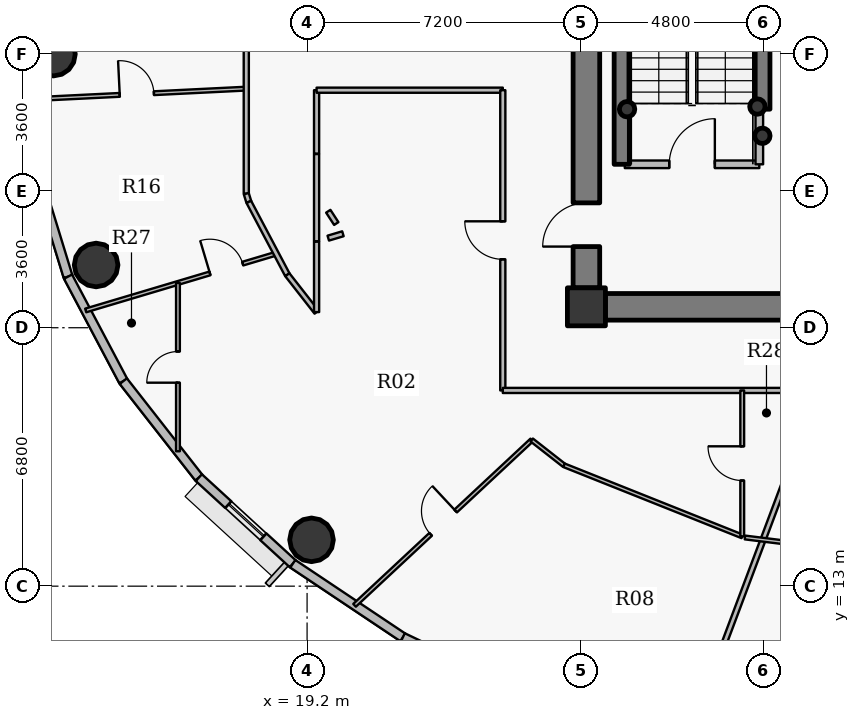
"""IFC4 building model, lengths in metres.
Left out: names, types, materials, properties, quantities, classifications, styles, units other than length and angle.
Written with IfcOpenShell. Run it as: python <this file> out.ifc"""

import sys

from ifc_helpers import new_model, si_unit, direction, frame, frame_2d, origin, origin_2d, place, context, subcontext, project, spatial, rectangle, hollow_circle, extrude, source, transform, mapped, element, fill, save


model = new_model("IFC4")
c1 = context("Model", 3, precision=1e-05, world=origin(), true_north=direction((0.0, 1.0)))
c2 = subcontext(c1, "Body", "Model", "MODEL_VIEW")
j1 = project(units=[si_unit("LENGTHUNIT", "METRE"), si_unit("PLANEANGLEUNIT", "RADIAN")], contexts=[c1])
p1 = place(None, origin())
s1 = spatial("IfcSite", under=j1, at=p1, CompositionType="ELEMENT")
p2 = place(p1, origin())
s2 = spatial("IfcBuilding", under=s1, at=p2, CompositionType="ELEMENT")
p3 = place(p2, frame((0.0, 0.0, 225.3)))
s3 = spatial("IfcBuildingStorey", under=s2, at=p3, CompositionType="ELEMENT", Elevation=225.3)
p4 = place(p3, frame((26.55, 20.35, 0.0), z_axis=(0.0, 0.0, 1.0), x_axis=(1.0, 0.0, 0.0)))
e1 = element("IfcColumn", 1, at=p4, inside=s3, PredefinedType="COLUMN", context=c2, shape_type="SweptSolid", body=[
    extrude(rectangle(XDim=1.0, YDim=1.0, at=origin_2d()), origin(), (0.0, 0.0, 1.0), 3.75),
])
p5 = place(p3, frame((27.48, 24.1, 0.0), z_axis=(0.0, 0.0, 1.0), x_axis=(0.0, 1.0, 0.0)))
e2 = element("IfcWall", 2, at=p5, inside=s3, PredefinedType="SHEAR", context=c2, shape_type="SweptSolid", body=[
    extrude(rectangle(XDim=8.6, YDim=0.4, at=frame_2d((4.3, 0.0))), origin(), (0.0, 0.0, 1.0), 3.75),
])
for number, where, z_axis, x_axis in (
    (3, (31.05, 25.62, 0.0), (0.0, 0.0, 1.0), (1.0, 0.0, 0.0)),
    (4, (31.18, 24.85, 0.0), (0.0, 0.0, 1.0), (1.0, 0.0, 0.0)),
    (5, (27.62, 25.55, 0.0), (0.0, 0.0, 1.0), (1.0, 0.0, 0.0)),
):
    element("IfcColumn", number, at=place(p3, frame(where, z_axis=z_axis, x_axis=x_axis)), inside=s3, PredefinedType="COLUMN", context=c2, shape_type="SweptSolid", body=[
        extrude(hollow_circle(Radius=0.203, WallThickness=0.016, at=origin_2d()), origin(), (0.0, 0.0, 1.0), 3.75),
    ])
p6 = place(p3, frame((44.95, 20.35, 0.0), z_axis=(0.0, 0.0, 1.0), x_axis=(-1.0, 0.0, 0.0)))
e6 = element("IfcWall", 6, at=p6, inside=s3, PredefinedType="SHEAR", context=c2, shape_type="SweptSolid", body=[
    extrude(rectangle(XDim=17.9, YDim=0.7, at=frame_2d((8.95, 0.0))), origin(), (0.0, 0.0, 1.0), 3.05),
])
p7 = place(p6, frame((9.7, 0.0, 0.0)))
e7 = element("IfcOpeningElement", 7, at=p7, cuts=e6, PredefinedType="OPENING", context=c2, shape_type="SweptSolid", body=[
    extrude(rectangle(XDim=1.15, YDim=2.15, at=origin_2d()), frame((0.575, 0.36, 1.075), z_axis=(0.0, -1.0, 0.0), x_axis=(1.0, 0.0, 0.0)), (0.0, 0.0, 1.0), 0.72),
])
p8 = place(p3, frame((26.55, 20.85, 0.0), z_axis=(0.0, 0.0, 1.0), x_axis=(0.0, 1.0, 0.0)))
e8 = element("IfcWall", 8, at=p8, inside=s3, PredefinedType="SHEAR", context=c2, shape_type="SweptSolid", body=[
    extrude(rectangle(XDim=12.3, YDim=0.7, at=frame_2d((6.15, 0.0))), origin(), (0.0, 0.0, 1.0), 3.05),
])
p9 = place(p8, frame((1.085, 0.0, 0.0)))
e9 = element("IfcOpeningElement", 9, at=p9, cuts=e8, PredefinedType="OPENING", context=c2, shape_type="SweptSolid", body=[
    extrude(rectangle(XDim=1.15, YDim=2.15, at=origin_2d()), frame((0.575, 0.36, 1.075), z_axis=(0.0, -1.0, 0.0), x_axis=(1.0, 0.0, 0.0)), (0.0, 0.0, 1.0), 0.72),
])
p10 = place(p3, frame((31.18, 25.55, 0.0), z_axis=(0.0, 0.0, 1.0), x_axis=(0.0, 1.0, 0.0)))
e10 = element("IfcWall", 10, at=p10, inside=s3, PredefinedType="SHEAR", context=c2, shape_type="SweptSolid", body=[
    extrude(rectangle(XDim=2.25, YDim=0.4, at=frame_2d((1.125, 0.0))), origin(), (0.0, 0.0, 1.0), 3.1),
])
for number, where, z_axis, x_axis in (
    (11, (12.525, 27.0, 0.0), (0.0, 0.0, 1.0), (1.0, 0.0, 0.0)),
    (12, (13.649, 21.451, 0.0), (0.0, 0.0, 1.0), (1.0, 0.0, 0.0)),
    (13, (19.317, 14.219, 0.0), (0.0, 0.0, 1.0), (1.0, 0.0, 0.0)),
):
    element("IfcColumn", number, at=place(p3, frame(where, z_axis=z_axis, x_axis=x_axis)), inside=s3, PredefinedType="COLUMN", context=c2, shape_type="SweptSolid", body=[
        extrude(hollow_circle(Radius=0.575, WallThickness=0.036, at=origin_2d()), origin(), (0.0, 0.0, 1.0), 3.75),
    ])
p11 = place(p3, frame((12.91, 21.144, 0.0), z_axis=(0.0, 0.0, 1.0), x_axis=(-0.293132907334, 0.95607170162, 0.0)))
e14 = element("IfcWall", 14, at=p11, inside=s3, PredefinedType="SOLIDWALL", context=c2, shape_type="SweptSolid", body=[
    extrude(rectangle(XDim=3.025, YDim=0.24, at=frame_2d((1.512, 0.0))), origin(), (0.0, 0.0, 1.0), 3.5),
])
p12 = place(p3, frame((14.364, 18.395, 0.0), z_axis=(0.0, 0.0, 1.0), x_axis=(-0.46766049993, 0.883908172157, 0.0)))
e15 = element("IfcWall", 15, at=p12, inside=s3, PredefinedType="SOLIDWALL", context=c2, shape_type="SweptSolid", body=[
    extrude(rectangle(XDim=3.11, YDim=0.24, at=frame_2d((1.555, 0.0))), origin(), (0.0, 0.0, 1.0), 3.5),
])
p13 = place(p3, frame((16.352, 15.855, 0.0), z_axis=(0.0, 0.0, 1.0), x_axis=(-0.616312344705, 0.787501805562, 0.0)))
e16 = element("IfcWall", 16, at=p13, inside=s3, PredefinedType="SOLIDWALL", context=c2, shape_type="SweptSolid", body=[
    extrude(rectangle(XDim=3.225, YDim=0.24, at=frame_2d((1.612, 0.0))), origin(), (0.0, 0.0, 1.0), 3.5),
])
p14 = place(p3, frame((18.824, 13.589, 0.0), z_axis=(0.0, 0.0, 1.0), x_axis=(-0.737123922599, 0.675757591694, 0.0)))
e17 = element("IfcWall", 17, at=p14, inside=s3, PredefinedType="SOLIDWALL", context=c2, shape_type="SweptSolid", body=[
    extrude(rectangle(XDim=3.354, YDim=0.24, at=frame_2d((1.677, 0.0))), origin(), (0.0, 0.0, 1.0), 3.5),
])
p15 = place(p14, frame((1.052, 0.0, 0.9)))
e18 = element("IfcOpeningElement", 18, at=p15, cuts=e17, PredefinedType="OPENING", context=c2, shape_type="SweptSolid", body=[
    extrude(rectangle(XDim=1.25, YDim=1.65, at=origin_2d()), frame((0.625, 0.13, 0.825), z_axis=(0.0, -1.0, 0.0), x_axis=(1.0, 0.0, 0.0)), (0.0, 0.0, 1.0), 0.26),
])
p16 = place(p3, frame((21.72, 11.652, 0.0), z_axis=(0.0, 0.0, 1.0), x_axis=(-0.831262496074, 0.555880079352, 0.0)))
e19 = element("IfcWall", 19, at=p16, inside=s3, PredefinedType="SOLIDWALL", context=c2, shape_type="SweptSolid", body=[
    extrude(rectangle(XDim=3.484, YDim=0.24, at=frame_2d((1.742, 0.0))), origin(), (0.0, 0.0, 1.0), 3.5),
])
p17 = place(p3, frame((24.969, 10.094, 0.0), z_axis=(0.0, 0.0, 1.0), x_axis=(-0.901598104751, 0.432574684313, 0.0)))
e20 = element("IfcWall", 20, at=p17, inside=s3, PredefinedType="SOLIDWALL", context=c2, shape_type="SweptSolid", body=[
    extrude(rectangle(XDim=3.604, YDim=0.24, at=frame_2d((1.802, 0.0))), origin(), (0.0, 0.0, 1.0), 3.5),
])
p18 = place(p3, frame((11.84, 25.807, 0.0), z_axis=(0.0, 0.0, 1.0), x_axis=(0.99878109644, 0.049359106487, 0.0)))
e21 = element("IfcWall", 21, at=p18, inside=s3, PredefinedType="PARTITIONING", context=c2, shape_type="SweptSolid", body=[
    extrude(rectangle(XDim=5.767, YDim=0.1, at=frame_2d((2.884, 0.0))), origin(), (0.0, 0.0, 1.0), 2.985),
])
p19 = place(p18, frame((2.434, 0.0, 0.0)))
e22 = element("IfcOpeningElement", 22, at=p19, cuts=e21, PredefinedType="OPENING", context=c2, shape_type="SweptSolid", body=[
    extrude(rectangle(XDim=0.9, YDim=2.1, at=origin_2d()), frame((0.45, 0.06, 1.05), z_axis=(0.0, -1.0, 0.0), x_axis=(1.0, 0.0, 0.0)), (0.0, 0.0, 1.0), 0.12),
])
p20 = place(p3, frame((13.375, 20.255, 0.0), z_axis=(0.0, 0.0, 1.0), x_axis=(0.95831691216, 0.285707360544, 0.0)))
e23 = element("IfcWall", 23, at=p20, inside=s3, PredefinedType="PARTITIONING", context=c2, shape_type="SweptSolid", body=[
    extrude(rectangle(XDim=5.23, YDim=0.1, at=frame_2d((2.615, 0.0))), origin(), (0.0, 0.0, 1.0), 2.985),
])
p21 = place(p20, frame((3.412, 0.0, 0.0)))
e24 = element("IfcOpeningElement", 24, at=p21, cuts=e23, PredefinedType="OPENING", context=c2, shape_type="SweptSolid", body=[
    extrude(rectangle(XDim=0.9, YDim=2.1, at=origin_2d()), frame((0.45, 0.06, 1.05), z_axis=(0.0, -1.0, 0.0), x_axis=(1.0, 0.0, 0.0)), (0.0, 0.0, 1.0), 0.12),
])
p22 = place(p3, frame((15.802, 16.55, 0.0), z_axis=(0.0, 0.0, 1.0), x_axis=(0.0, 1.0, 0.0)))
e25 = element("IfcWall", 25, at=p22, inside=s3, PredefinedType="PARTITIONING", context=c2, shape_type="SweptSolid", body=[
    extrude(rectangle(XDim=4.429, YDim=0.1, at=frame_2d((2.214, 0.0))), origin(), (0.0, 0.0, 1.0), 2.985),
])
p23 = place(p22, frame((1.804, 0.0, 0.0)))
e26 = element("IfcOpeningElement", 26, at=p23, cuts=e25, PredefinedType="OPENING", context=c2, shape_type="SweptSolid", body=[
    extrude(rectangle(XDim=0.82, YDim=2.1, at=origin_2d()), frame((0.41, 0.06, 1.05), z_axis=(0.0, -1.0, 0.0), x_axis=(1.0, 0.0, 0.0)), (0.0, 0.0, 1.0), 0.12),
])
p24 = place(p3, frame((17.6, 23.328, 0.0), z_axis=(0.0, 0.0, 1.0), x_axis=(0.0, 1.0, 0.0)))
e27 = element("IfcWall", 27, at=p24, inside=s3, PredefinedType="PARTITIONING", context=c2, shape_type="SweptSolid", body=[
    extrude(rectangle(XDim=4.622, YDim=0.135, at=frame_2d((2.311, 0.0))), origin(), (0.0, 0.0, 1.0), 2.935),
])
p25 = place(p3, frame((17.6, 23.328, 0.0), z_axis=(0.0, 0.0, 1.0), x_axis=(0.292875000845, -0.956150738053, 0.0)))
e28 = element("IfcWall", 28, at=p25, inside=s3, PredefinedType="PARTITIONING", context=c2, shape_type="SweptSolid", body=[
    extrude(rectangle(XDim=0.227, YDim=0.135, at=frame_2d((0.113, 0.0))), origin(), (0.0, 0.0, 1.0), 3.5),
])
p26 = place(p3, frame((17.667, 23.111, 0.0), z_axis=(0.0, 0.0, 1.0), x_axis=(0.467582558239, -0.883949405357, 0.0)))
e29 = element("IfcWall", 29, at=p26, inside=s3, PredefinedType="PARTITIONING", context=c2, shape_type="SweptSolid", body=[
    extrude(rectangle(XDim=2.169, YDim=0.135, at=frame_2d((1.084, 0.0))), origin(), (0.0, 0.0, 1.0), 2.935),
])
p27 = place(p3, frame((18.681, 21.194, 0.0), z_axis=(0.0, 0.0, 1.0), x_axis=(0.616239706802, -0.787558647823, 0.0)))
e30 = element("IfcWall", 30, at=p27, inside=s3, PredefinedType="PARTITIONING", context=c2, shape_type="SweptSolid", body=[
    extrude(rectangle(XDim=1.248, YDim=0.135, at=frame_2d((0.624, 0.0))), origin(), (0.0, 0.0, 1.0), 3.5),
])
p28 = place(p3, frame((19.45, 20.211, 0.0), z_axis=(0.0, 0.0, 1.0), x_axis=(0.0, 1.0, 0.0)))
e31 = element("IfcWall", 31, at=p28, inside=s3, PredefinedType="PARTITIONING", context=c2, shape_type="SweptSolid", body=[
    extrude(rectangle(XDim=1.855, YDim=0.135, at=frame_2d((0.927, 0.0))), origin(), (0.0, 0.0, 1.0), 3.5),
])
p29 = place(p3, frame((19.45, 24.38, 0.0), z_axis=(0.0, 0.0, 1.0), x_axis=(0.0, 1.0, 0.0)))
e32 = element("IfcWall", 32, at=p29, inside=s3, PredefinedType="PARTITIONING", context=c2, shape_type="SweptSolid", body=[
    extrude(rectangle(XDim=1.67, YDim=0.135, at=frame_2d((0.835, 0.0))), origin(), (0.0, 0.0, 1.0), 3.5),
])
p30 = place(p3, frame((19.45, 26.05, 0.0), z_axis=(0.0, 0.0, 1.0), x_axis=(1.0, 0.0, 0.0)))
e33 = element("IfcWall", 33, at=p30, inside=s3, PredefinedType="PARTITIONING", context=c2, shape_type="SweptSolid", body=[
    extrude(rectangle(XDim=4.9, YDim=0.135, at=frame_2d((2.45, 0.0))), origin(), (0.0, 0.0, 1.0), 3.5),
])
p31 = place(p3, frame((20.449, 12.496, 0.0), z_axis=(0.0, 0.0, 1.0), x_axis=(0.731298421662, 0.682057635743, 0.0)))
e34 = element("IfcWall", 34, at=p31, inside=s3, PredefinedType="PARTITIONING", context=c2, shape_type="SweptSolid", body=[
    extrude(rectangle(XDim=6.376, YDim=0.1, at=frame_2d((3.188, 0.0))), origin(), (0.0, 0.0, 1.0), 2.985),
])
p32 = place(p31, frame((2.738, 0.0, 0.0)))
e35 = element("IfcOpeningElement", 35, at=p32, cuts=e34, PredefinedType="OPENING", context=c2, shape_type="SweptSolid", body=[
    extrude(rectangle(XDim=0.9, YDim=2.1, at=origin_2d()), frame((0.45, 0.06, 1.05), z_axis=(0.0, -1.0, 0.0), x_axis=(1.0, 0.0, 0.0)), (0.0, 0.0, 1.0), 0.12),
])
p33 = place(p3, frame((24.35, 18.15, 0.0), z_axis=(0.0, 0.0, 1.0), x_axis=(0.0, 1.0, 0.0)))
e36 = element("IfcWall", 36, at=p33, inside=s3, PredefinedType="PARTITIONING", context=c2, shape_type="SweptSolid", body=[
    extrude(rectangle(XDim=7.9, YDim=0.135, at=frame_2d((3.95, 0.0))), origin(), (0.0, 0.0, 1.0), 2.935),
])
p34 = place(p33, frame((3.45, 0.0, 0.0)))
e37 = element("IfcOpeningElement", 37, at=p34, cuts=e36, PredefinedType="OPENING", context=c2, shape_type="SweptSolid", body=[
    extrude(rectangle(XDim=1.0, YDim=2.15, at=origin_2d()), frame((0.5, 0.078, 1.075), z_axis=(0.0, -1.0, 0.0), x_axis=(1.0, 0.0, 0.0)), (0.0, 0.0, 1.0), 0.155),
])
p35 = place(p3, frame((24.35, 18.15, 0.0), z_axis=(0.0, 0.0, 1.0), x_axis=(1.0, 0.0, 0.0)))
e38 = element("IfcWall", 38, at=p35, inside=s3, PredefinedType="PARTITIONING", context=c2, shape_type="SweptSolid", body=[
    extrude(rectangle(XDim=23.85, YDim=0.135, at=frame_2d((11.925, 0.0))), origin(), (0.0, 0.0, 1.0), 2.935),
])
p36 = place(p35, frame((14.099, 0.0, 0.0)))
e39 = element("IfcOpeningElement", 39, at=p36, cuts=e38, PredefinedType="OPENING", context=c2, shape_type="SweptSolid", body=[
    extrude(rectangle(XDim=1.0, YDim=2.15, at=origin_2d()), frame((0.5, 0.078, 1.075), z_axis=(0.0, -1.0, 0.0), x_axis=(1.0, 0.0, 0.0)), (0.0, 0.0, 1.0), 0.155),
])
p37 = place(p35, frame((20.638, 0.0, 0.0)))
e40 = element("IfcOpeningElement", 40, at=p37, cuts=e38, PredefinedType="OPENING", context=c2, shape_type="SweptSolid", body=[
    extrude(rectangle(XDim=1.0, YDim=2.15, at=origin_2d()), frame((0.5, 0.078, 1.075), z_axis=(0.0, -1.0, 0.0), x_axis=(1.0, 0.0, 0.0)), (0.0, 0.0, 1.0), 0.155),
])
p38 = place(p3, frame((25.112, 16.845, 0.0), z_axis=(0.0, 0.0, 1.0), x_axis=(0.787433290794, -0.616399880394, 0.0)))
e41 = element("IfcWall", 41, at=p38, inside=s3, PredefinedType="PARTITIONING", context=c2, shape_type="SweptSolid", body=[
    extrude(rectangle(XDim=1.078, YDim=0.1, at=frame_2d((0.539, 0.0))), origin(), (0.0, 0.0, 1.0), 3.5),
])
p39 = place(p3, frame((25.961, 16.181, 0.0), z_axis=(0.0, 0.0, 1.0), x_axis=(0.928803127631, -0.370573542098, 0.0)))
e42 = element("IfcWall", 42, at=p39, inside=s3, PredefinedType="PARTITIONING", context=c2, shape_type="SweptSolid", body=[
    extrude(rectangle(XDim=5.049, YDim=0.1, at=frame_2d((2.524, 0.0))), origin(), (0.0, 0.0, 1.0), 2.935),
])
p40 = place(p3, frame((27.56, 24.1, 0.0), z_axis=(0.0, 0.0, 1.0), x_axis=(1.0, 0.0, 0.0)))
e43 = element("IfcWall", 43, at=p40, inside=s3, PredefinedType="PARTITIONING", context=c2, shape_type="SweptSolid", body=[
    extrude(rectangle(XDim=3.54, YDim=0.2, at=frame_2d((1.77, 0.0))), origin(), (0.0, 0.0, 1.0), 3.5),
])
p41 = place(p40, frame((1.17, 0.0, 0.0)))
e44 = element("IfcOpeningElement", 44, at=p41, cuts=e43, PredefinedType="OPENING", context=c2, shape_type="SweptSolid", body=[
    extrude(rectangle(XDim=1.2, YDim=2.15, at=origin_2d()), frame((0.6, 0.11, 1.075), z_axis=(0.0, -1.0, 0.0), x_axis=(1.0, 0.0, 0.0)), (0.0, 0.0, 1.0), 0.22),
])
p42 = place(p3, frame((29.169, 8.819, 0.0), z_axis=(0.0, 0.0, 1.0), x_axis=(0.351676288836, 0.936121673646, 0.0)))
e45 = element("IfcWall", 45, at=p42, inside=s3, PredefinedType="PARTITIONING", context=c2, shape_type="SweptSolid", body=[
    extrude(rectangle(XDim=9.968, YDim=0.135, at=frame_2d((4.984, 0.0))), origin(), (0.0, 0.0, 1.0), 2.985),
])
p43 = place(p3, frame((30.65, 14.31, 0.0), z_axis=(0.0, 0.0, 1.0), x_axis=(0.0, 1.0, 0.0)))
e46 = element("IfcWall", 46, at=p43, inside=s3, PredefinedType="PARTITIONING", context=c2, shape_type="SweptSolid", body=[
    extrude(rectangle(XDim=3.84, YDim=0.1, at=frame_2d((1.92, 0.0))), origin(), (0.0, 0.0, 1.0), 3.5),
])
p44 = place(p43, frame((1.47, 0.0, 0.0)))
e47 = element("IfcOpeningElement", 47, at=p44, cuts=e46, PredefinedType="OPENING", context=c2, shape_type="SweptSolid", body=[
    extrude(rectangle(XDim=0.9, YDim=2.1, at=origin_2d()), frame((0.45, 0.06, 1.05), z_axis=(0.0, -1.0, 0.0), x_axis=(1.0, 0.0, 0.0)), (0.0, 0.0, 1.0), 0.12),
])
p45 = place(p3, frame((30.722, 14.281, 0.0), z_axis=(0.0, 0.0, 1.0), x_axis=(0.992398169186, -0.123068573551, 0.0)))
e48 = element("IfcWall", 48, at=p45, inside=s3, PredefinedType="PARTITIONING", context=c2, shape_type="SweptSolid", body=[
    extrude(rectangle(XDim=5.319, YDim=0.1, at=frame_2d((2.659, 0.0))), origin(), (0.0, 0.0, 1.0), 2.935),
])
p46 = place(p3, frame((31.1, 24.1, 0.0), z_axis=(0.0, 0.0, 1.0), x_axis=(0.0, 1.0, 0.0)))
e49 = element("IfcWall", 49, at=p46, inside=s3, PredefinedType="PARTITIONING", context=c2, shape_type="SweptSolid", body=[
    extrude(rectangle(XDim=1.44, YDim=0.2, at=frame_2d((0.72, 0.0))), origin(), (0.0, 0.0, 1.0), 3.5),
])
p47 = place(p3, frame((19.45, 24.37, 0.0), z_axis=(0.0, 0.0, 1.0), x_axis=(0.0, -1.0, 0.0)))
e50 = element("IfcWall", 50, at=p47, inside=s3, PredefinedType="PARTITIONING", context=c2, shape_type="SweptSolid", body=[
    extrude(rectangle(XDim=2.294, YDim=0.135, at=frame_2d((1.147, 0.0))), origin(), (0.0, 0.0, 1.0), 2.935),
])
p48 = place(p3, frame((26.2, 20.84, 0.0), z_axis=(0.0, 0.0, 1.0), x_axis=(0.0, -1.0, 0.0)))
e51 = element("IfcWall", 51, at=p48, inside=s3, PredefinedType="PARTITIONING", context=c2, shape_type="SweptSolid", body=[
    extrude(rectangle(XDim=0.84, YDim=0.135, at=frame_2d((0.42, 0.0))), origin(), (0.0, 0.0, 1.0), 3.5),
])
p49 = place(p3, frame((26.508, 20.0, 0.0), z_axis=(0.0, 0.0, 1.0), x_axis=(1.0, 0.0, 0.0)))
e52 = element("IfcWall", 52, at=p49, inside=s3, PredefinedType="PARTITIONING", context=c2, shape_type="SweptSolid", body=[
    extrude(rectangle(XDim=0.532, YDim=0.135, at=frame_2d((0.266, 0.0))), origin(), (0.0, 0.0, 1.0), 2.935),
])
p50 = place(p3, frame((19.758, 22.157, 0.0), z_axis=(0.0, 0.0, 1.0), x_axis=(0.95827609565, 0.285844231191, 0.0)))
e53 = element("IfcWall", 53, at=p50, inside=s3, PredefinedType="PARTITIONING", context=c2, shape_type="SweptSolid", body=[
    extrude(rectangle(XDim=0.402, YDim=0.135, at=frame_2d((0.201, 0.0))), origin(), (0.0, 0.0, 1.0), 3.5),
])
p51 = place(p3, frame((19.968, 22.541, 0.0), z_axis=(0.0, 0.0, 1.0), x_axis=(-0.545477029726, 0.838125772209, 0.0)))
e54 = element("IfcWall", 54, at=p51, inside=s3, PredefinedType="PARTITIONING", context=c2, shape_type="SweptSolid", body=[
    extrude(rectangle(XDim=0.386, YDim=0.135, at=frame_2d((0.193, 0.0))), origin(), (0.0, 0.0, 1.0), 2.935),
])
m1 = source(origin(), c2, "Body", "SweptSolid", [
    extrude(rectangle(XDim=1.25, YDim=1.65, at=origin_2d()), frame((0.625, 0.03, 0.825), z_axis=(0.0, -1.0, 0.0), x_axis=(1.0, 0.0, 0.0)), (0.0, 0.0, 1.0), 0.06),
])
p52 = place(p15, origin())
e55 = element("IfcWindow", 55, at=p52, inside=s3, PartitioningType="SINGLE_PANEL", PredefinedType="WINDOW", context=c2, shape_type="MappedRepresentation", body=[
    mapped(m1, transform((0.0, 0.0, 0.0), x_axis=(1.0, 0.0, 0.0), y_axis=(0.0, 1.0, 0.0), z_axis=(0.0, 0.0, 1.0), scale=1.0)),
])
fill(e18, e55)
m2 = source(origin(), c2, "Body", "SweptSolid", [
    extrude(rectangle(XDim=1.15, YDim=2.15, at=origin_2d()), frame((0.575, 0.025, 1.075), z_axis=(0.0, -1.0, 0.0), x_axis=(1.0, 0.0, 0.0)), (0.0, 0.0, 1.0), 0.05),
])
p53 = place(p9, origin())
e56 = element("IfcDoor", 56, at=p53, inside=s3, OperationType="SINGLE_SWING_LEFT", PredefinedType="DOOR", context=c2, shape_type="MappedRepresentation", body=[
    mapped(m2, transform((0.0, 0.0, 0.0), x_axis=(1.0, 0.0, 0.0), y_axis=(0.0, 1.0, 0.0), z_axis=(0.0, 0.0, 1.0), scale=1.0)),
])
fill(e9, e56)
m3 = source(origin(), c2, "Body", "SweptSolid", [
    extrude(rectangle(XDim=1.2, YDim=2.15, at=origin_2d()), frame((0.6, 0.025, 1.075), z_axis=(0.0, -1.0, 0.0), x_axis=(1.0, 0.0, 0.0)), (0.0, 0.0, 1.0), 0.05),
])
p54 = place(p41, origin())
e57 = element("IfcDoor", 57, at=p54, inside=s3, OperationType="SINGLE_SWING_RIGHT", PredefinedType="DOOR", context=c2, shape_type="MappedRepresentation", body=[
    mapped(m3, transform((0.0, 0.0, 0.0), x_axis=(1.0, 0.0, 0.0), y_axis=(0.0, 1.0, 0.0), z_axis=(0.0, 0.0, 1.0), scale=1.0)),
])
fill(e44, e57)
m4 = source(origin(), c2, "Body", "SweptSolid", [
    extrude(rectangle(XDim=1.0, YDim=2.15, at=origin_2d()), frame((0.5, 0.025, 1.075), z_axis=(0.0, -1.0, 0.0), x_axis=(1.0, 0.0, 0.0)), (0.0, 0.0, 1.0), 0.05),
])
p55 = place(p34, origin())
e58 = element("IfcDoor", 58, at=p55, inside=s3, OperationType="SINGLE_SWING_RIGHT", PredefinedType="DOOR", context=c2, shape_type="MappedRepresentation", body=[
    mapped(m4, transform((0.0, 0.0, 0.0), x_axis=(1.0, 0.0, 0.0), y_axis=(0.0, 1.0, 0.0), z_axis=(0.0, 0.0, 1.0), scale=1.0)),
])
fill(e37, e58)
m5 = source(origin(), c2, "Body", "SweptSolid", [
    extrude(rectangle(XDim=0.9, YDim=2.1, at=origin_2d()), frame((0.45, 0.025, 1.05), z_axis=(0.0, -1.0, 0.0), x_axis=(1.0, 0.0, 0.0)), (0.0, 0.0, 1.0), 0.05),
])
p56 = place(p21, origin())
e59 = element("IfcDoor", 59, at=p56, inside=s3, OperationType="SINGLE_SWING_LEFT", PredefinedType="DOOR", context=c2, shape_type="MappedRepresentation", body=[
    mapped(m5, transform((0.0, 0.0, 0.0), x_axis=(1.0, 0.0, 0.0), y_axis=(0.0, 1.0, 0.0), z_axis=(0.0, 0.0, 1.0), scale=1.0)),
])
fill(e24, e59)
p57 = place(p32, origin())
e60 = element("IfcDoor", 60, at=p57, inside=s3, OperationType="SINGLE_SWING_RIGHT", PredefinedType="DOOR", context=c2, shape_type="MappedRepresentation", body=[
    mapped(m5, transform((0.0, 0.0, 0.0), x_axis=(1.0, 0.0, 0.0), y_axis=(0.0, 1.0, 0.0), z_axis=(0.0, 0.0, 1.0), scale=1.0)),
])
fill(e35, e60)
m6 = source(origin(), c2, "Body", "SweptSolid", [
    extrude(rectangle(XDim=0.82, YDim=2.1, at=origin_2d()), frame((0.41, 0.025, 1.05), z_axis=(0.0, -1.0, 0.0), x_axis=(1.0, 0.0, 0.0)), (0.0, 0.0, 1.0), 0.05),
])
p58 = place(p23, origin())
e61 = element("IfcDoor", 61, at=p58, inside=s3, OperationType="SINGLE_SWING_LEFT", PredefinedType="DOOR", context=c2, shape_type="MappedRepresentation", body=[
    mapped(m6, transform((0.0, 0.0, 0.0), x_axis=(1.0, 0.0, 0.0), y_axis=(0.0, 1.0, 0.0), z_axis=(0.0, 0.0, 1.0), scale=1.0)),
])
fill(e26, e61)
p59 = place(p44, origin())
e62 = element("IfcDoor", 62, at=p59, inside=s3, OperationType="SINGLE_SWING_RIGHT", PredefinedType="DOOR", context=c2, shape_type="MappedRepresentation", body=[
    mapped(m5, transform((0.0, 0.0, 0.0), x_axis=(1.0, 0.0, 0.0), y_axis=(0.0, 1.0, 0.0), z_axis=(0.0, 0.0, 1.0), scale=1.0)),
])
fill(e47, e62)
p60 = place(p19, origin())
e63 = element("IfcDoor", 63, at=p60, inside=s3, OperationType="SINGLE_SWING_LEFT", PredefinedType="DOOR", context=c2, shape_type="MappedRepresentation", body=[
    mapped(m5, transform((0.0, 0.0, 0.0), x_axis=(1.0, 0.0, 0.0), y_axis=(0.0, 1.0, 0.0), z_axis=(0.0, 0.0, 1.0), scale=1.0)),
])
fill(e22, e63)
save(model, sys.argv[1])
